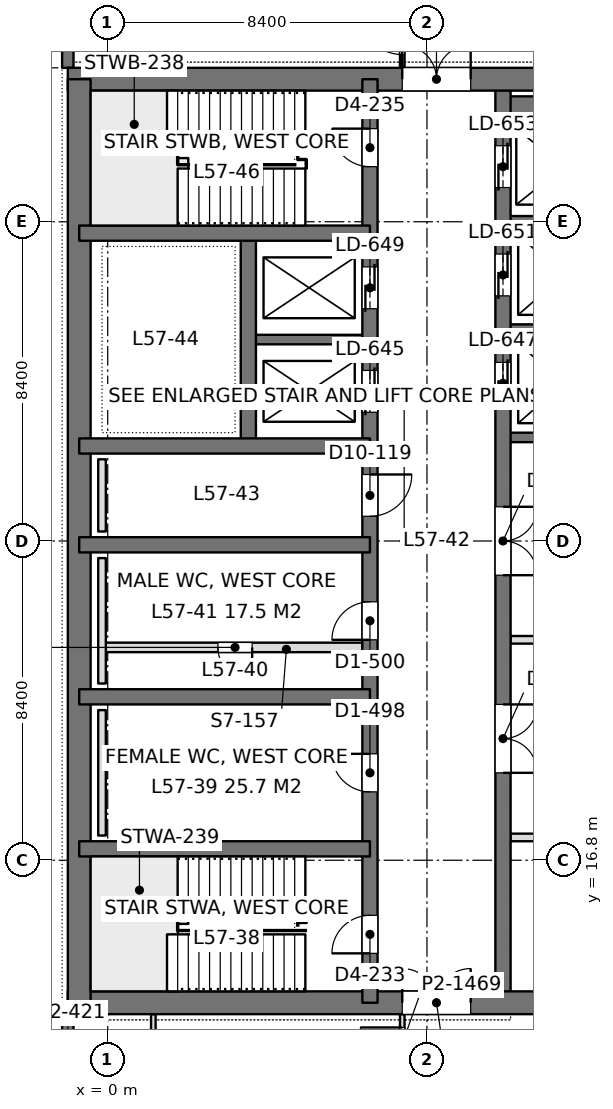
"""IFC4 building model, lengths in metres.
Left out: names, types, materials, properties, quantities, classifications, styles, units other than length and angle.
Written with IfcOpenShell. Run it as: python <this file> out.ifc"""

import sys

from ifc_helpers import new_model, si_unit, direction, frame, frame_2d, origin, place, context, subcontext, project, spatial, rectangle, extrude, element, fill, save


model = new_model("IFC4")
c1 = context("Model", 3, precision=1e-05, world=origin(), true_north=direction((0.0, 1.0)))
c2 = subcontext(c1, "Body", "Model", "MODEL_VIEW")
j1 = project(units=[si_unit("LENGTHUNIT", "METRE"), si_unit("PLANEANGLEUNIT", "RADIAN")], contexts=[c1])
p1 = place(None, origin())
s1 = spatial("IfcSite", under=j1, at=p1, CompositionType="ELEMENT")
p2 = place(p1, origin())
s2 = spatial("IfcBuilding", under=s1, at=p2, CompositionType="ELEMENT")
p3 = place(p2, frame((0.0, 0.0, 250.2)))
s3 = spatial("IfcBuildingStorey", under=s2, at=p3, CompositionType="ELEMENT", Elevation=250.2)
p4 = place(p3, frame((-1.05, 13.05, 0.0), z_axis=(0.0, 0.0, 1.0), x_axis=(1.0, 0.0, 0.0)))
e1 = element("IfcWall", 1, at=p4, inside=s3, PredefinedType="SHEAR", context=c2, shape_type="SweptSolid", body=[
    extrude(rectangle(XDim=17.7, YDim=0.6, at=frame_2d((8.85, 0.0))), origin(), (0.0, 0.0, 1.0), 4.5),
])
p5 = place(p4, frame((8.8, 0.0, 0.0)))
e2 = element("IfcOpeningElement", 2, at=p5, cuts=e1, PredefinedType="OPENING", context=c2, shape_type="SweptSolid", body=[
    extrude(rectangle(XDim=1.8, YDim=2.4, at=frame_2d((0.9, 1.2))), frame((0.0, 0.31, 0.0), z_axis=(0.0, -1.0, 0.0), x_axis=(1.0, 0.0, 0.0)), (0.0, 0.0, 1.0), 0.62),
])
p6 = place(p3, frame((-1.05, 37.35, 0.0), z_axis=(0.0, 0.0, 1.0), x_axis=(1.0, 0.0, 0.0)))
e3 = element("IfcWall", 3, at=p6, inside=s3, PredefinedType="SHEAR", context=c2, shape_type="SweptSolid", body=[
    extrude(rectangle(XDim=17.7, YDim=0.6, at=frame_2d((8.85, 0.0))), origin(), (0.0, 0.0, 1.0), 4.5),
])
p7 = place(p6, frame((8.8, 0.0, 0.0)))
e4 = element("IfcOpeningElement", 4, at=p7, cuts=e3, PredefinedType="OPENING", context=c2, shape_type="SweptSolid", body=[
    extrude(rectangle(XDim=1.8, YDim=2.4, at=frame_2d((0.9, 1.2))), frame((0.0, 0.31, 0.0), z_axis=(0.0, -1.0, 0.0), x_axis=(1.0, 0.0, 0.0)), (0.0, 0.0, 1.0), 0.62),
])
p8 = place(p3, frame((-0.75, 13.05, 0.0), z_axis=(0.0, 0.0, 1.0), x_axis=(0.0, 1.0, 0.0)))
e5 = element("IfcWall", 5, at=p8, inside=s3, PredefinedType="SHEAR", context=c2, shape_type="SweptSolid", body=[
    extrude(rectangle(XDim=24.3, YDim=0.6, at=frame_2d((12.15, 0.0))), origin(), (0.0, 0.0, 1.0), 4.5),
])
p9 = place(p3, frame((6.9, 13.05, 0.0), z_axis=(0.0, 0.0, 1.0), x_axis=(0.0, 1.0, 0.0)))
e6 = element("IfcWall", 6, at=p9, inside=s3, PredefinedType="SHEAR", context=c2, shape_type="SweptSolid", body=[
    extrude(rectangle(XDim=24.3, YDim=0.4, at=frame_2d((12.15, 0.0))), origin(), (0.0, 0.0, 1.0), 4.5),
])
p10 = place(p9, frame((1.3, 0.0, 0.0)))
e7 = element("IfcOpeningElement", 7, at=p10, cuts=e6, PredefinedType="OPENING", context=c2, shape_type="SweptSolid", body=[
    extrude(rectangle(XDim=1.0, YDim=2.2, at=frame_2d((0.5, 1.1))), frame((0.0, 0.21, 0.0), z_axis=(0.0, -1.0, 0.0), x_axis=(1.0, 0.0, 0.0)), (0.0, 0.0, 1.0), 0.42),
])
p11 = place(p9, frame((22.0, 0.0, 0.0)))
e8 = element("IfcOpeningElement", 8, at=p11, cuts=e6, PredefinedType="OPENING", context=c2, shape_type="SweptSolid", body=[
    extrude(rectangle(XDim=1.0, YDim=2.2, at=frame_2d((0.5, 1.1))), frame((0.0, 0.21, 0.0), z_axis=(0.0, -1.0, 0.0), x_axis=(1.0, 0.0, 0.0)), (0.0, 0.0, 1.0), 0.42),
])
p12 = place(p9, frame((5.55, 0.0, 0.0)))
e9 = element("IfcOpeningElement", 9, at=p12, cuts=e6, PredefinedType="OPENING", context=c2, shape_type="SweptSolid", body=[
    extrude(rectangle(XDim=1.0, YDim=2.2, at=frame_2d((0.5, 1.1))), frame((0.0, 0.21, 0.0), z_axis=(0.0, -1.0, 0.0), x_axis=(1.0, 0.0, 0.0)), (0.0, 0.0, 1.0), 0.42),
])
p13 = place(p9, frame((9.55, 0.0, 0.0)))
e10 = element("IfcOpeningElement", 10, at=p13, cuts=e6, PredefinedType="OPENING", context=c2, shape_type="SweptSolid", body=[
    extrude(rectangle(XDim=1.0, YDim=2.2, at=frame_2d((0.5, 1.1))), frame((0.0, 0.21, 0.0), z_axis=(0.0, -1.0, 0.0), x_axis=(1.0, 0.0, 0.0)), (0.0, 0.0, 1.0), 0.42),
])
p14 = place(p9, frame((12.8, 0.0, 0.0)))
e11 = element("IfcOpeningElement", 11, at=p14, cuts=e6, PredefinedType="OPENING", context=c2, shape_type="SweptSolid", body=[
    extrude(rectangle(XDim=1.1, YDim=2.2, at=frame_2d((0.55, 1.1))), frame((0.0, 0.21, 0.0), z_axis=(0.0, -1.0, 0.0), x_axis=(1.0, 0.0, 0.0)), (0.0, 0.0, 1.0), 0.42),
])
p15 = place(p9, frame((15.538, 0.0, 0.0)))
e12 = element("IfcOpeningElement", 12, at=p15, cuts=e6, PredefinedType="OPENING", context=c2, shape_type="SweptSolid", body=[
    extrude(rectangle(XDim=1.1, YDim=2.2, at=frame_2d((0.55, 1.1))), frame((0.0, 0.21, 0.0), z_axis=(0.0, -1.0, 0.0), x_axis=(1.0, 0.0, 0.0)), (0.0, 0.0, 1.0), 0.42),
])
p16 = place(p9, frame((18.262, 0.0, 0.0)))
e13 = element("IfcOpeningElement", 13, at=p16, cuts=e6, PredefinedType="OPENING", context=c2, shape_type="SweptSolid", body=[
    extrude(rectangle(XDim=1.1, YDim=2.2, at=frame_2d((0.55, 1.1))), frame((0.0, 0.21, 0.0), z_axis=(0.0, -1.0, 0.0), x_axis=(1.0, 0.0, 0.0)), (0.0, 0.0, 1.0), 0.42),
])
p17 = place(p3, frame((10.4, 13.05, 0.0), z_axis=(0.0, 0.0, 1.0), x_axis=(0.0, 1.0, 0.0)))
e14 = element("IfcWall", 14, at=p17, inside=s3, PredefinedType="SHEAR", context=c2, shape_type="SweptSolid", body=[
    extrude(rectangle(XDim=24.3, YDim=0.4, at=frame_2d((12.15, 0.0))), origin(), (0.0, 0.0, 1.0), 4.5),
])
p18 = place(p17, frame((15.75, 0.0, 0.0)))
e15 = element("IfcOpeningElement", 15, at=p18, cuts=e14, PredefinedType="OPENING", context=c2, shape_type="SweptSolid", body=[
    extrude(rectangle(XDim=1.1, YDim=2.2, at=frame_2d((0.55, 1.1))), frame((0.0, 0.21, 0.0), z_axis=(0.0, -1.0, 0.0), x_axis=(1.0, 0.0, 0.0)), (0.0, 0.0, 1.0), 0.42),
])
p19 = place(p17, frame((18.6, 0.0, 0.0)))
e16 = element("IfcOpeningElement", 16, at=p19, cuts=e14, PredefinedType="OPENING", context=c2, shape_type="SweptSolid", body=[
    extrude(rectangle(XDim=1.1, YDim=2.2, at=frame_2d((0.55, 1.1))), frame((0.0, 0.21, 0.0), z_axis=(0.0, -1.0, 0.0), x_axis=(1.0, 0.0, 0.0)), (0.0, 0.0, 1.0), 0.42),
])
p20 = place(p17, frame((21.45, 0.0, 0.0)))
e17 = element("IfcOpeningElement", 17, at=p20, cuts=e14, PredefinedType="OPENING", context=c2, shape_type="SweptSolid", body=[
    extrude(rectangle(XDim=1.1, YDim=2.2, at=frame_2d((0.55, 1.1))), frame((0.0, 0.21, 0.0), z_axis=(0.0, -1.0, 0.0), x_axis=(1.0, 0.0, 0.0)), (0.0, 0.0, 1.0), 0.42),
])
p21 = place(p17, frame((6.05, 0.0, 0.0)))
e18 = element("IfcOpeningElement", 18, at=p21, cuts=e14, PredefinedType="OPENING", context=c2, shape_type="SweptSolid", body=[
    extrude(rectangle(XDim=1.8, YDim=2.4, at=frame_2d((0.9, 1.2))), frame((0.0, 0.21, 0.0), z_axis=(0.0, -1.0, 0.0), x_axis=(1.0, 0.0, 0.0)), (0.0, 0.0, 1.0), 0.42),
])
p22 = place(p17, frame((11.25, 0.0, 0.0)))
e19 = element("IfcOpeningElement", 19, at=p22, cuts=e14, PredefinedType="OPENING", context=c2, shape_type="SweptSolid", body=[
    extrude(rectangle(XDim=1.8, YDim=2.4, at=frame_2d((0.9, 1.2))), frame((0.0, 0.21, 0.0), z_axis=(0.0, -1.0, 0.0), x_axis=(1.0, 0.0, 0.0)), (0.0, 0.0, 1.0), 0.42),
])
for number, where, z_axis, x_axis in (
    (20, (-0.75, 17.1, 0.0), (0.0, 0.0, 1.0), (1.0, 0.0, 0.0)),
    (21, (-0.75, 21.1, 0.0), (0.0, 0.0, 1.0), (1.0, 0.0, 0.0)),
    (22, (-0.75, 25.1, 0.0), (0.0, 0.0, 1.0), (1.0, 0.0, 0.0)),
    (23, (-0.75, 27.7, 0.0), (0.0, 0.0, 1.0), (1.0, 0.0, 0.0)),
    (24, (-0.75, 33.3, 0.0), (0.0, 0.0, 1.0), (1.0, 0.0, 0.0)),
):
    element("IfcWall", number, at=place(p3, frame(where, z_axis=z_axis, x_axis=x_axis)), inside=s3, PredefinedType="SHEAR", context=c2, shape_type="SweptSolid", body=[
        extrude(rectangle(XDim=7.65, YDim=0.4, at=frame_2d((3.825, 0.0))), origin(), (0.0, 0.0, 1.0), 4.5),
    ])
p23 = place(p3, frame((3.7, 27.7, 0.0), z_axis=(0.0, 0.0, 1.0), x_axis=(0.0, 1.0, 0.0)))
e25 = element("IfcWall", 25, at=p23, inside=s3, PredefinedType="SHEAR", context=c2, shape_type="SweptSolid", body=[
    extrude(rectangle(XDim=5.6, YDim=0.4, at=frame_2d((2.8, 0.0))), origin(), (0.0, 0.0, 1.0), 4.5),
])
p24 = place(p3, frame((3.7, 30.5, 0.0), z_axis=(0.0, 0.0, 1.0), x_axis=(1.0, 0.0, 0.0)))
e26 = element("IfcWall", 26, at=p24, inside=s3, PredefinedType="SHEAR", context=c2, shape_type="SweptSolid", body=[
    extrude(rectangle(XDim=3.2, YDim=0.25, at=frame_2d((1.6, 0.0))), origin(), (0.0, 0.0, 1.0), 4.5),
])
p25 = place(p3, frame((10.4, 27.925, 0.0), z_axis=(0.0, 0.0, 1.0), x_axis=(1.0, 0.0, 0.0)))
e27 = element("IfcWall", 27, at=p25, inside=s3, PredefinedType="SHEAR", context=c2, shape_type="SweptSolid", body=[
    extrude(rectangle(XDim=5.95, YDim=0.25, at=frame_2d((2.975, 0.0))), origin(), (0.0, 0.0, 1.0), 4.5),
])
for number, where, z_axis, x_axis in (
    (28, (10.4, 30.775, 0.0), (0.0, 0.0, 1.0), (1.0, 0.0, 0.0)),
    (29, (10.4, 33.625, 0.0), (0.0, 0.0, 1.0), (1.0, 0.0, 0.0)),
):
    element("IfcWall", number, at=place(p3, frame(where, z_axis=z_axis, x_axis=x_axis)), inside=s3, PredefinedType="SHEAR", context=c2, shape_type="SweptSolid", body=[
        extrude(rectangle(XDim=3.2, YDim=0.25, at=frame_2d((1.6, 0.0))), origin(), (0.0, 0.0, 1.0), 4.5),
    ])
p26 = place(p3, frame((10.4, 36.625, 0.0), z_axis=(0.0, 0.0, 1.0), x_axis=(1.0, 0.0, 0.0)))
e30 = element("IfcWall", 30, at=p26, inside=s3, PredefinedType="SHEAR", context=c2, shape_type="SweptSolid", body=[
    extrude(rectangle(XDim=3.2, YDim=0.55, at=frame_2d((1.6, 0.0))), origin(), (0.0, 0.0, 1.0), 4.5),
])
p27 = place(p3, frame((-1.05, 8.4, 0.0), z_axis=(0.0, 0.0, 1.0), x_axis=(0.0, 1.0, 0.0)))
e31 = element("IfcWall", 31, at=p27, inside=s3, PredefinedType="SOLIDWALL", context=c2, shape_type="SweptSolid", body=[
    extrude(rectangle(XDim=4.35, YDim=0.3, at=frame_2d((2.175, 0.0))), origin(), (0.0, 0.0, 1.0), 4.35),
])
p28 = place(p27, frame((0.975, 0.0, 0.9)))
e32 = element("IfcOpeningElement", 32, at=p28, cuts=e31, PredefinedType="OPENING", context=c2, shape_type="SweptSolid", body=[
    extrude(rectangle(XDim=2.4, YDim=1.9, at=frame_2d((1.2, 0.95))), frame((0.0, 0.16, 0.0), z_axis=(0.0, -1.0, 0.0), x_axis=(1.0, 0.0, 0.0)), (0.0, 0.0, 1.0), 0.32),
])
p29 = place(p3, frame((-1.05, 37.65, 0.0), z_axis=(0.0, 0.0, 1.0), x_axis=(0.0, 1.0, 0.0)))
e33 = element("IfcWall", 33, at=p29, inside=s3, PredefinedType="SOLIDWALL", context=c2, shape_type="SweptSolid", body=[
    extrude(rectangle(XDim=4.35, YDim=0.3, at=frame_2d((2.175, 0.0))), origin(), (0.0, 0.0, 1.0), 4.35),
])
p30 = place(p29, frame((0.975, 0.0, 0.9)))
e34 = element("IfcOpeningElement", 34, at=p30, cuts=e33, PredefinedType="OPENING", context=c2, shape_type="SweptSolid", body=[
    extrude(rectangle(XDim=2.4, YDim=1.9, at=frame_2d((1.2, 0.95))), frame((0.0, 0.16, 0.0), z_axis=(0.0, -1.0, 0.0), x_axis=(1.0, 0.0, 0.0)), (0.0, 0.0, 1.0), 0.32),
])
p31 = place(p3, frame((10.598, 17.4, 0.0), z_axis=(0.0, 0.0, 1.0), x_axis=(1.0, 0.0, 0.0)))
e35 = element("IfcWall", 35, at=p31, inside=s3, PredefinedType="PARTITIONING", context=c2, shape_type="SweptSolid", body=[
    extrude(rectangle(XDim=5.904, YDim=0.2, at=frame_2d((2.952, 0.0))), origin(), (0.0, 0.0, 1.0), 3.8),
])
p32 = place(p3, frame((10.598, 22.6, 0.0), z_axis=(0.0, 0.0, 1.0), x_axis=(1.0, 0.0, 0.0)))
e36 = element("IfcWall", 36, at=p32, inside=s3, PredefinedType="PARTITIONING", context=c2, shape_type="SweptSolid", body=[
    extrude(rectangle(XDim=5.053, YDim=0.2, at=frame_2d((2.526, 0.0))), origin(), (0.0, 0.0, 1.0), 4.35),
])
p33 = place(p3, frame((7.75, 11.198, 0.0), z_axis=(0.0, 0.0, 1.0), x_axis=(0.0, 1.0, 0.0)))
e37 = element("IfcWall", 37, at=p33, inside=s3, PredefinedType="PARTITIONING", context=c2, shape_type="SweptSolid", body=[
    extrude(rectangle(XDim=1.554, YDim=0.12, at=frame_2d((0.777, 0.0))), origin(), (0.0, 0.0, 1.0), 4.35),
])
p34 = place(p33, frame((0.102, 0.0, 0.0)))
e38 = element("IfcOpeningElement", 38, at=p34, cuts=e37, PredefinedType="OPENING", context=c2, shape_type="SweptSolid", body=[
    extrude(rectangle(XDim=1.1, YDim=2.4, at=frame_2d((0.55, 1.2))), frame((0.0, 0.07, 0.0), z_axis=(0.0, -1.0, 0.0), x_axis=(1.0, 0.0, 0.0)), (0.0, 0.0, 1.0), 0.14),
])
p35 = place(p3, frame((1.2, 11.1, 0.0), z_axis=(0.0, 0.0, 1.0), x_axis=(0.0, 1.0, 0.0)))
e39 = element("IfcWall", 39, at=p35, inside=s3, PredefinedType="PARTITIONING", context=c2, shape_type="SweptSolid", body=[
    extrude(rectangle(XDim=1.652, YDim=0.12, at=frame_2d((0.826, 0.0))), origin(), (0.0, 0.0, 1.0), 4.35),
])
p36 = place(p3, frame((7.75, 37.648, 0.0), z_axis=(0.0, 0.0, 1.0), x_axis=(0.0, 1.0, 0.0)))
e40 = element("IfcWall", 40, at=p36, inside=s3, PredefinedType="PARTITIONING", context=c2, shape_type="SweptSolid", body=[
    extrude(rectangle(XDim=1.554, YDim=0.12, at=frame_2d((0.777, 0.0))), origin(), (0.0, 0.0, 1.0), 4.35),
])
p37 = place(p36, frame((0.352, 0.0, 0.0)))
e41 = element("IfcOpeningElement", 41, at=p37, cuts=e40, PredefinedType="OPENING", context=c2, shape_type="SweptSolid", body=[
    extrude(rectangle(XDim=1.1, YDim=2.4, at=frame_2d((0.55, 1.2))), frame((0.0, 0.07, 0.0), z_axis=(0.0, -1.0, 0.0), x_axis=(1.0, 0.0, 0.0)), (0.0, 0.0, 1.0), 0.14),
])
p38 = place(p3, frame((1.2, 37.648, 0.0), z_axis=(0.0, 0.0, 1.0), x_axis=(0.0, 1.0, 0.0)))
e42 = element("IfcWall", 42, at=p38, inside=s3, PredefinedType="PARTITIONING", context=c2, shape_type="SweptSolid", body=[
    extrude(rectangle(XDim=1.652, YDim=0.12, at=frame_2d((0.826, 0.0))), origin(), (0.0, 0.0, 1.0), 4.35),
])
p39 = place(p3, frame((-0.05, 22.4, 0.0), z_axis=(0.0, 0.0, 1.0), x_axis=(1.0, 0.0, 0.0)))
e43 = element("IfcWall", 43, at=p39, inside=s3, PredefinedType="PARTITIONING", context=c2, shape_type="SweptSolid", body=[
    extrude(rectangle(XDim=6.75, YDim=0.25, at=frame_2d((3.375, 0.0))), origin(), (0.0, 0.0, 1.0), 4.3),
])
p40 = place(p39, frame((2.95, 0.0, 0.0)))
e44 = element("IfcOpeningElement", 44, at=p40, cuts=e43, PredefinedType="OPENING", context=c2, shape_type="SweptSolid", body=[
    extrude(rectangle(XDim=0.9, YDim=2.2, at=frame_2d((0.45, 1.1))), frame((0.0, 0.135, 0.0), z_axis=(0.0, -1.0, 0.0), x_axis=(1.0, 0.0, 0.0)), (0.0, 0.0, 1.0), 0.27),
])
for number, where, z_axis, x_axis in (
    (45, (-0.15, 17.45, 0.0), (0.0, 0.0, 1.0), (0.0, 1.0, 0.0)),
    (46, (-0.15, 21.45, 0.0), (0.0, 0.0, 1.0), (0.0, 1.0, 0.0)),
):
    element("IfcWall", number, at=place(p3, frame(where, z_axis=z_axis, x_axis=x_axis)), inside=s3, PredefinedType="PLUMBINGWALL", context=c2, shape_type="SweptSolid", body=[
        extrude(rectangle(XDim=3.3, YDim=0.2, at=frame_2d((1.65, 0.0))), origin(), (0.0, 0.0, 1.0), 1.2),
    ])
p41 = place(p3, frame((-0.15, 25.45, 0.0), z_axis=(0.0, 0.0, 1.0), x_axis=(0.0, 1.0, 0.0)))
e47 = element("IfcWall", 47, at=p41, inside=s3, PredefinedType="PLUMBINGWALL", context=c2, shape_type="SweptSolid", body=[
    extrude(rectangle(XDim=1.9, YDim=0.2, at=frame_2d((0.95, 0.0))), origin(), (0.0, 0.0, 1.0), 1.2),
])
p42 = place(p5, origin())
e48 = element("IfcDoor", 48, at=p42, inside=s3, OperationType="DOUBLE_DOOR_SINGLE_SWING", PredefinedType="DOOR", context=c2, shape_type="SweptSolid", body=[
    extrude(rectangle(XDim=1.8, YDim=2.4, at=frame_2d((0.9, 1.2))), frame((0.0, 0.025, 0.0), z_axis=(0.0, -1.0, 0.0), x_axis=(1.0, 0.0, 0.0)), (0.0, 0.0, 1.0), 0.05),
])
fill(e2, e48)
p43 = place(p7, origin())
e49 = element("IfcDoor", 49, at=p43, inside=s3, OperationType="DOUBLE_DOOR_SINGLE_SWING", PredefinedType="DOOR", context=c2, shape_type="SweptSolid", body=[
    extrude(rectangle(XDim=1.8, YDim=2.4, at=frame_2d((0.9, 1.2))), frame((0.0, 0.025, 0.0), z_axis=(0.0, -1.0, 0.0), x_axis=(1.0, 0.0, 0.0)), (0.0, 0.0, 1.0), 0.05),
])
fill(e4, e49)
p44 = place(p10, origin())
e50 = element("IfcDoor", 50, at=p44, inside=s3, OperationType="SINGLE_SWING_LEFT", PredefinedType="DOOR", context=c2, shape_type="SweptSolid", body=[
    extrude(rectangle(XDim=1.0, YDim=2.2, at=frame_2d((0.5, 1.1))), frame((0.0, 0.025, 0.0), z_axis=(0.0, -1.0, 0.0), x_axis=(1.0, 0.0, 0.0)), (0.0, 0.0, 1.0), 0.05),
])
fill(e7, e50)
p45 = place(p11, origin())
e51 = element("IfcDoor", 51, at=p45, inside=s3, OperationType="SINGLE_SWING_RIGHT", PredefinedType="DOOR", context=c2, shape_type="SweptSolid", body=[
    extrude(rectangle(XDim=1.0, YDim=2.2, at=frame_2d((0.5, 1.1))), frame((0.0, 0.025, 0.0), z_axis=(0.0, -1.0, 0.0), x_axis=(1.0, 0.0, 0.0)), (0.0, 0.0, 1.0), 0.05),
])
fill(e8, e51)
p46 = place(p12, origin())
e52 = element("IfcDoor", 52, at=p46, inside=s3, OperationType="SINGLE_SWING_RIGHT", PredefinedType="DOOR", context=c2, shape_type="SweptSolid", body=[
    extrude(rectangle(XDim=1.0, YDim=2.2, at=frame_2d((0.5, 1.1))), frame((0.0, 0.025, 0.0), z_axis=(0.0, -1.0, 0.0), x_axis=(1.0, 0.0, 0.0)), (0.0, 0.0, 1.0), 0.05),
])
fill(e9, e52)
p47 = place(p13, origin())
e53 = element("IfcDoor", 53, at=p47, inside=s3, OperationType="SINGLE_SWING_LEFT", PredefinedType="DOOR", context=c2, shape_type="SweptSolid", body=[
    extrude(rectangle(XDim=1.0, YDim=2.2, at=frame_2d((0.5, 1.1))), frame((0.0, 0.025, 0.0), z_axis=(0.0, -1.0, 0.0), x_axis=(1.0, 0.0, 0.0)), (0.0, 0.0, 1.0), 0.05),
])
fill(e10, e53)
p48 = place(p14, frame((1.1, 0.0, 0.0), z_axis=(0.0, 0.0, 1.0), x_axis=(-1.0, 0.0, 0.0)))
e54 = element("IfcDoor", 54, at=p48, inside=s3, OperationType="SINGLE_SWING_LEFT", PredefinedType="DOOR", context=c2, shape_type="SweptSolid", body=[
    extrude(rectangle(XDim=1.1, YDim=2.2, at=frame_2d((0.55, 1.1))), frame((0.0, 0.025, 0.0), z_axis=(0.0, -1.0, 0.0), x_axis=(1.0, 0.0, 0.0)), (0.0, 0.0, 1.0), 0.05),
])
fill(e11, e54)
p49 = place(p18, origin())
e55 = element("IfcDoor", 55, at=p49, inside=s3, OperationType="DOUBLE_DOOR_SLIDING", PredefinedType="DOOR", context=c2, shape_type="SweptSolid", body=[
    extrude(rectangle(XDim=1.1, YDim=2.2, at=frame_2d((0.55, 1.1))), frame((0.0, 0.025, 0.0), z_axis=(0.0, -1.0, 0.0), x_axis=(1.0, 0.0, 0.0)), (0.0, 0.0, 1.0), 0.05),
])
fill(e15, e55)
p50 = place(p19, origin())
e56 = element("IfcDoor", 56, at=p50, inside=s3, OperationType="DOUBLE_DOOR_SLIDING", PredefinedType="DOOR", context=c2, shape_type="SweptSolid", body=[
    extrude(rectangle(XDim=1.1, YDim=2.2, at=frame_2d((0.55, 1.1))), frame((0.0, 0.025, 0.0), z_axis=(0.0, -1.0, 0.0), x_axis=(1.0, 0.0, 0.0)), (0.0, 0.0, 1.0), 0.05),
])
fill(e16, e56)
p51 = place(p20, origin())
e57 = element("IfcDoor", 57, at=p51, inside=s3, OperationType="DOUBLE_DOOR_SLIDING", PredefinedType="DOOR", context=c2, shape_type="SweptSolid", body=[
    extrude(rectangle(XDim=1.1, YDim=2.2, at=frame_2d((0.55, 1.1))), frame((0.0, 0.025, 0.0), z_axis=(0.0, -1.0, 0.0), x_axis=(1.0, 0.0, 0.0)), (0.0, 0.0, 1.0), 0.05),
])
fill(e17, e57)
p52 = place(p15, origin())
e58 = element("IfcDoor", 58, at=p52, inside=s3, OperationType="DOUBLE_DOOR_SLIDING", PredefinedType="DOOR", context=c2, shape_type="SweptSolid", body=[
    extrude(rectangle(XDim=1.1, YDim=2.2, at=frame_2d((0.55, 1.1))), frame((0.0, 0.025, 0.0), z_axis=(0.0, -1.0, 0.0), x_axis=(1.0, 0.0, 0.0)), (0.0, 0.0, 1.0), 0.05),
])
fill(e12, e58)
p53 = place(p16, origin())
e59 = element("IfcDoor", 59, at=p53, inside=s3, OperationType="DOUBLE_DOOR_SLIDING", PredefinedType="DOOR", context=c2, shape_type="SweptSolid", body=[
    extrude(rectangle(XDim=1.1, YDim=2.2, at=frame_2d((0.55, 1.1))), frame((0.0, 0.025, 0.0), z_axis=(0.0, -1.0, 0.0), x_axis=(1.0, 0.0, 0.0)), (0.0, 0.0, 1.0), 0.05),
])
fill(e13, e59)
p54 = place(p21, frame((1.8, 0.0, 0.0), z_axis=(0.0, 0.0, 1.0), x_axis=(-1.0, 0.0, 0.0)))
e60 = element("IfcDoor", 60, at=p54, inside=s3, OperationType="DOUBLE_DOOR_SINGLE_SWING", PredefinedType="DOOR", context=c2, shape_type="SweptSolid", body=[
    extrude(rectangle(XDim=1.8, YDim=2.4, at=frame_2d((0.9, 1.2))), frame((0.0, 0.025, 0.0), z_axis=(0.0, -1.0, 0.0), x_axis=(1.0, 0.0, 0.0)), (0.0, 0.0, 1.0), 0.05),
])
fill(e18, e60)
p55 = place(p22, frame((1.8, 0.0, 0.0), z_axis=(0.0, 0.0, 1.0), x_axis=(-1.0, 0.0, 0.0)))
e61 = element("IfcDoor", 61, at=p55, inside=s3, OperationType="DOUBLE_DOOR_SINGLE_SWING", PredefinedType="DOOR", context=c2, shape_type="SweptSolid", body=[
    extrude(rectangle(XDim=1.8, YDim=2.4, at=frame_2d((0.9, 1.2))), frame((0.0, 0.025, 0.0), z_axis=(0.0, -1.0, 0.0), x_axis=(1.0, 0.0, 0.0)), (0.0, 0.0, 1.0), 0.05),
])
fill(e19, e61)
p56 = place(p34, origin())
e62 = element("IfcDoor", 62, at=p56, inside=s3, OperationType="SINGLE_SWING_RIGHT", PredefinedType="DOOR", context=c2, shape_type="SweptSolid", body=[
    extrude(rectangle(XDim=1.1, YDim=2.4, at=frame_2d((0.55, 1.2))), frame((0.0, 0.025, 0.0), z_axis=(0.0, -1.0, 0.0), x_axis=(1.0, 0.0, 0.0)), (0.0, 0.0, 1.0), 0.05),
])
fill(e38, e62)
p57 = place(p37, origin())
e63 = element("IfcDoor", 63, at=p57, inside=s3, OperationType="SINGLE_SWING_RIGHT", PredefinedType="DOOR", context=c2, shape_type="SweptSolid", body=[
    extrude(rectangle(XDim=1.1, YDim=2.4, at=frame_2d((0.55, 1.2))), frame((0.0, 0.025, 0.0), z_axis=(0.0, -1.0, 0.0), x_axis=(1.0, 0.0, 0.0)), (0.0, 0.0, 1.0), 0.05),
])
fill(e41, e63)
p58 = place(p40, frame((0.9, 0.0, 0.0), z_axis=(0.0, 0.0, 1.0), x_axis=(-1.0, 0.0, 0.0)))
e64 = element("IfcDoor", 64, at=p58, inside=s3, OperationType="SINGLE_SWING_LEFT", PredefinedType="DOOR", context=c2, shape_type="SweptSolid", body=[
    extrude(rectangle(XDim=0.9, YDim=2.2, at=frame_2d((0.45, 1.1))), frame((0.0, 0.025, 0.0), z_axis=(0.0, -1.0, 0.0), x_axis=(1.0, 0.0, 0.0)), (0.0, 0.0, 1.0), 0.05),
])
fill(e44, e64)
save(model, sys.argv[1])
